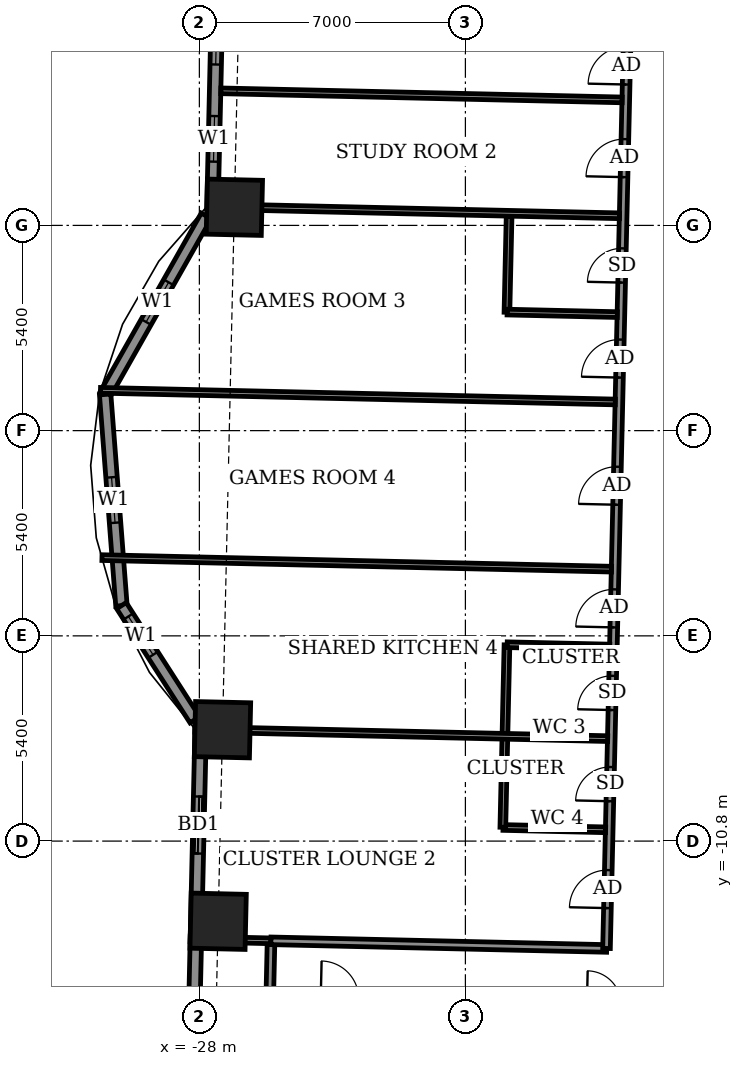
"""IFC4 building model, lengths in metres.
Left out: names, types, materials, properties, quantities, classifications, styles, units other than length and angle.
Written with IfcOpenShell. Run it as: python <this file> out.ifc"""

import sys

from ifc_helpers import new_model, si_unit, direction, frame, frame_2d, origin, origin_2d, place, context, subcontext, project, spatial, rectangle, extrude, element, fill, save


model = new_model("IFC4")
c1 = context("Model", 3, precision=1e-05, world=origin(), true_north=direction((0.0, 1.0)))
c2 = subcontext(c1, "Body", "Model", "MODEL_VIEW")
j1 = project(units=[si_unit("LENGTHUNIT", "METRE"), si_unit("PLANEANGLEUNIT", "RADIAN")], contexts=[c1])
p1 = place(None, origin())
s1 = spatial("IfcSite", under=j1, at=p1, CompositionType="ELEMENT")
p2 = place(p1, origin())
s2 = spatial("IfcBuilding", under=s1, at=p2, CompositionType="ELEMENT")
p3 = place(p2, frame((0.0, 0.0, 67.5)))
s3 = spatial("IfcBuildingStorey", under=s2, at=p3, CompositionType="ELEMENT", Elevation=67.5)
for number, where, z_axis, x_axis in (
    (1, (-27.391, -7.869, -0.55), (0.0, 0.0, 1.0), (-0.023, -1.0, 0.0)),
    (2, (-27.506, -12.909, -0.55), (0.0, 0.0, 1.0), (-0.023, -1.0, 0.0)),
    (3, (-27.079, 5.877, -0.55), (0.0, 0.0, 1.0), (-0.023, -1.0, 0.0)),
):
    element("IfcColumn", number, at=place(p3, frame(where, z_axis=z_axis, x_axis=x_axis)), inside=s3, PredefinedType="COLUMN", context=c2, shape_type="SweptSolid", body=[
        extrude(rectangle(XDim=1.45, YDim=1.45, at=origin_2d()), origin(), (0.0, 0.0, 1.0), 3.6),
    ])
p4 = place(p3, frame((-27.324, 20.462, 0.0), z_axis=(0.0, 0.0, 1.0), x_axis=(-0.022695628174, -0.999742421057, 0.0)))
e4 = element("IfcWall", 4, at=p4, inside=s3, PredefinedType="SOLIDWALL", context=c2, shape_type="SweptSolid", body=[
    extrude(rectangle(XDim=14.63, YDim=0.3, at=frame_2d((7.315, 0.0))), origin(), (0.0, 0.0, 1.0), 3.05),
])
p5 = place(p4, frame((3.118, 0.0, 0.0)))
e5 = element("IfcOpeningElement", 5, at=p5, cuts=e4, PredefinedType="OPENING", context=c2, shape_type="SweptSolid", body=[
    extrude(rectangle(XDim=1.5, YDim=2.4, at=frame_2d((0.75, 1.2))), frame((0.0, 0.16, 0.0), z_axis=(0.0, -1.0, 0.0), x_axis=(1.0, 0.0, 0.0)), (0.0, 0.0, 1.0), 0.32),
])
p6 = place(p4, frame((8.431, 0.0, 0.9)))
e6 = element("IfcOpeningElement", 6, at=p6, cuts=e4, PredefinedType="OPENING", context=c2, shape_type="SweptSolid", body=[
    extrude(rectangle(XDim=2.4, YDim=1.5, at=frame_2d((1.2, 0.75))), frame((0.0, 0.16, 0.0), z_axis=(0.0, -1.0, 0.0), x_axis=(1.0, 0.0, 0.0)), (0.0, 0.0, 1.0), 0.32),
])
p7 = place(p4, frame((12.188, 0.0, 0.9)))
e7 = element("IfcOpeningElement", 7, at=p7, cuts=e4, PredefinedType="OPENING", context=c2, shape_type="SweptSolid", body=[
    extrude(rectangle(XDim=1.2, YDim=1.5, at=frame_2d((0.6, 0.75))), frame((0.0, 0.16, 0.0), z_axis=(0.0, -1.0, 0.0), x_axis=(1.0, 0.0, 0.0)), (0.0, 0.0, 1.0), 0.32),
])
p8 = place(p3, frame((-27.82, 5.65, 0.0), z_axis=(0.0, 0.0, 1.0), x_axis=(-0.492554919955, -0.870281363025, 0.0)))
e8 = element("IfcWall", 8, at=p8, inside=s3, PredefinedType="SOLIDWALL", context=c2, shape_type="SweptSolid", body=[
    extrude(rectangle(XDim=5.398, YDim=0.3, at=frame_2d((2.699, 0.0))), origin(), (0.0, 0.0, 1.0), 3.05),
])
p9 = place(p8, frame((2.008, 0.0, 0.9)))
e9 = element("IfcOpeningElement", 9, at=p9, cuts=e8, PredefinedType="OPENING", context=c2, shape_type="SweptSolid", body=[
    extrude(rectangle(XDim=1.2, YDim=1.5, at=frame_2d((0.6, 0.75))), frame((0.0, 0.16, 0.0), z_axis=(0.0, -1.0, 0.0), x_axis=(1.0, 0.0, 0.0)), (0.0, 0.0, 1.0), 0.32),
])
p10 = place(p3, frame((-30.479, 0.952, 0.0), z_axis=(0.0, 0.0, 1.0), x_axis=(0.076964476481, -0.997033835614, 0.0)))
e10 = element("IfcWall", 10, at=p10, inside=s3, PredefinedType="SOLIDWALL", context=c2, shape_type="SweptSolid", body=[
    extrude(rectangle(XDim=5.573, YDim=0.3, at=frame_2d((2.787, 0.0))), origin(), (0.0, 0.0, 1.0), 3.05),
])
p11 = place(p10, frame((2.186, 0.0, 0.9)))
e11 = element("IfcOpeningElement", 11, at=p11, cuts=e10, PredefinedType="OPENING", context=c2, shape_type="SweptSolid", body=[
    extrude(rectangle(XDim=1.2, YDim=1.5, at=frame_2d((0.6, 0.75))), frame((0.0, 0.16, 0.0), z_axis=(0.0, -1.0, 0.0), x_axis=(1.0, 0.0, 0.0)), (0.0, 0.0, 1.0), 0.32),
])
p12 = place(p3, frame((-30.05, -4.605, 0.0), z_axis=(0.0, 0.0, 1.0), x_axis=(0.540653885242, -0.841245134532, 0.0)))
e12 = element("IfcWall", 12, at=p12, inside=s3, PredefinedType="SOLIDWALL", context=c2, shape_type="SweptSolid", body=[
    extrude(rectangle(XDim=3.57, YDim=0.3, at=frame_2d((1.785, 0.0))), origin(), (0.0, 0.0, 1.0), 3.05),
])
p13 = place(p12, frame((0.338, 0.0, 0.9)))
e13 = element("IfcOpeningElement", 13, at=p13, cuts=e12, PredefinedType="OPENING", context=c2, shape_type="SweptSolid", body=[
    extrude(rectangle(XDim=1.2, YDim=1.5, at=frame_2d((0.6, 0.75))), frame((0.0, 0.16, 0.0), z_axis=(0.0, -1.0, 0.0), x_axis=(1.0, 0.0, 0.0)), (0.0, 0.0, 1.0), 0.32),
])
p14 = place(p3, frame((-27.965, -7.802, 0.0), z_axis=(0.0, 0.0, 1.0), x_axis=(-0.02267786199, -0.999742824218, 0.0)))
e14 = element("IfcWall", 14, at=p14, inside=s3, PredefinedType="SOLIDWALL", context=c2, shape_type="SweptSolid", body=[
    extrude(rectangle(XDim=15.029, YDim=0.3, at=frame_2d((7.514, 0.0))), origin(), (0.0, 0.0, 1.0), 3.05),
])
p15 = place(p14, frame((1.826, 0.0, 0.0)))
e15 = element("IfcOpeningElement", 15, at=p15, cuts=e14, PredefinedType="OPENING", context=c2, shape_type="SweptSolid", body=[
    extrude(rectangle(XDim=1.5, YDim=2.4, at=frame_2d((0.75, 1.2))), frame((0.0, 0.16, 0.0), z_axis=(0.0, -1.0, 0.0), x_axis=(1.0, 0.0, 0.0)), (0.0, 0.0, 1.0), 0.32),
])
p16 = place(p14, frame((11.071, 0.0, 0.9)))
e16 = element("IfcOpeningElement", 16, at=p16, cuts=e14, PredefinedType="OPENING", context=c2, shape_type="SweptSolid", body=[
    extrude(rectangle(XDim=2.4, YDim=1.5, at=frame_2d((1.2, 0.75))), frame((0.0, 0.16, 0.0), z_axis=(0.0, -1.0, 0.0), x_axis=(1.0, 0.0, 0.0)), (0.0, 0.0, 1.0), 0.32),
])
p17 = place(p3, frame((-26.148, -14.924, 0.0), z_axis=(0.0, 0.0, 1.0), x_axis=(0.022617910375, 0.999744182344, 0.0)))
e17 = element("IfcWall", 17, at=p17, inside=s3, PredefinedType="PARTITIONING", context=c2, shape_type="SweptSolid", body=[
    extrude(rectangle(XDim=1.5, YDim=0.2, at=frame_2d((0.75, 0.0))), origin(), (0.0, 0.0, 1.0), 3.05),
])
p18 = place(p3, frame((-28.242, -13.376, 0.0), z_axis=(0.0, 0.0, 1.0), x_axis=(0.999743965862, -0.022627477169, 0.0)))
e18 = element("IfcWall", 18, at=p18, inside=s3, PredefinedType="PARTITIONING", context=c2, shape_type="SweptSolid", body=[
    extrude(rectangle(XDim=2.125, YDim=0.15, at=frame_2d((1.063, 0.0))), origin(), (0.0, 0.0, 1.0), 3.05),
])
p19 = place(p3, frame((-26.117, -13.424, 0.0), z_axis=(0.0, 0.0, 1.0), x_axis=(0.999741493133, -0.022736466476, 0.0)))
e19 = element("IfcWall", 19, at=p19, inside=s3, PredefinedType="PARTITIONING", context=c2, shape_type="SweptSolid", body=[
    extrude(rectangle(XDim=8.837, YDim=0.2, at=frame_2d((4.418, 0.0))), origin(), (0.0, 0.0, 1.0), 3.05),
])
p20 = place(p3, frame((-17.287, -13.625, 0.0), z_axis=(0.0, 0.0, 1.0), x_axis=(0.022712214871, 0.999742044377, 0.0)))
e20 = element("IfcWall", 20, at=p20, inside=s3, PredefinedType="PARTITIONING", context=c2, shape_type="SweptSolid", body=[
    extrude(rectangle(XDim=26.551, YDim=0.2, at=frame_2d((13.275, 0.0))), origin(), (0.0, 0.0, 1.0), 3.05),
])
p21 = place(p20, frame((22.738, 0.0, 0.0)))
e21 = element("IfcOpeningElement", 21, at=p21, cuts=e20, PredefinedType="OPENING", context=c2, shape_type="SweptSolid", body=[
    extrude(rectangle(XDim=1.0, YDim=2.1, at=frame_2d((0.5, 1.05))), frame((0.0, 0.11, 0.0), z_axis=(0.0, -1.0, 0.0), x_axis=(1.0, 0.0, 0.0)), (0.0, 0.0, 1.0), 0.22),
])
p22 = place(p20, frame((24.9, 0.0, 0.0)))
e22 = element("IfcOpeningElement", 22, at=p22, cuts=e20, PredefinedType="OPENING", context=c2, shape_type="SweptSolid", body=[
    extrude(rectangle(XDim=0.9, YDim=2.1, at=frame_2d((0.45, 1.05))), frame((0.0, 0.11, 0.0), z_axis=(0.0, -1.0, 0.0), x_axis=(1.0, 0.0, 0.0)), (0.0, 0.0, 1.0), 0.22),
])
p23 = place(p20, frame((20.3, 0.0, 0.0)))
e23 = element("IfcOpeningElement", 23, at=p23, cuts=e20, PredefinedType="OPENING", context=c2, shape_type="SweptSolid", body=[
    extrude(rectangle(XDim=1.0, YDim=2.1, at=frame_2d((0.5, 1.05))), frame((0.0, 0.11, 0.0), z_axis=(0.0, -1.0, 0.0), x_axis=(1.0, 0.0, 0.0)), (0.0, 0.0, 1.0), 0.22),
])
p24 = place(p20, frame((15.025, 0.0, 0.0)))
e24 = element("IfcOpeningElement", 24, at=p24, cuts=e20, PredefinedType="OPENING", context=c2, shape_type="SweptSolid", body=[
    extrude(rectangle(XDim=1.0, YDim=2.1, at=frame_2d((0.5, 1.05))), frame((0.0, 0.11, 0.0), z_axis=(0.0, -1.0, 0.0), x_axis=(1.0, 0.0, 0.0)), (0.0, 0.0, 1.0), 0.22),
])
p25 = place(p20, frame((17.525, 0.0, 0.0)))
e25 = element("IfcOpeningElement", 25, at=p25, cuts=e20, PredefinedType="OPENING", context=c2, shape_type="SweptSolid", body=[
    extrude(rectangle(XDim=0.9, YDim=2.1, at=frame_2d((0.45, 1.05))), frame((0.0, 0.11, 0.0), z_axis=(0.0, -1.0, 0.0), x_axis=(1.0, 0.0, 0.0)), (0.0, 0.0, 1.0), 0.22),
])
p26 = place(p20, frame((11.678, 0.0, 0.0)))
e26 = element("IfcOpeningElement", 26, at=p26, cuts=e20, PredefinedType="OPENING", context=c2, shape_type="SweptSolid", body=[
    extrude(rectangle(XDim=1.0, YDim=2.1, at=frame_2d((0.5, 1.05))), frame((0.0, 0.11, 0.0), z_axis=(0.0, -1.0, 0.0), x_axis=(1.0, 0.0, 0.0)), (0.0, 0.0, 1.0), 0.22),
])
p27 = place(p20, frame((8.45, 0.0, 0.0)))
e27 = element("IfcOpeningElement", 27, at=p27, cuts=e20, PredefinedType="OPENING", context=c2, shape_type="SweptSolid", body=[
    extrude(rectangle(XDim=1.0, YDim=2.1, at=frame_2d((0.5, 1.05))), frame((0.0, 0.11, 0.0), z_axis=(0.0, -1.0, 0.0), x_axis=(1.0, 0.0, 0.0)), (0.0, 0.0, 1.0), 0.22),
])
p28 = place(p20, frame((6.275, 0.0, 0.0)))
e28 = element("IfcOpeningElement", 28, at=p28, cuts=e20, PredefinedType="OPENING", context=c2, shape_type="SweptSolid", body=[
    extrude(rectangle(XDim=0.9, YDim=2.1, at=frame_2d((0.45, 1.05))), frame((0.0, 0.11, 0.0), z_axis=(0.0, -1.0, 0.0), x_axis=(1.0, 0.0, 0.0)), (0.0, 0.0, 1.0), 0.22),
])
p29 = place(p20, frame((1.062, 0.0, 0.0)))
e29 = element("IfcOpeningElement", 29, at=p29, cuts=e20, PredefinedType="OPENING", context=c2, shape_type="SweptSolid", body=[
    extrude(rectangle(XDim=1.0, YDim=2.1, at=frame_2d((0.5, 1.05))), frame((0.0, 0.11, 0.0), z_axis=(0.0, -1.0, 0.0), x_axis=(1.0, 0.0, 0.0)), (0.0, 0.0, 1.0), 0.22),
])
p30 = place(p20, frame((3.875, 0.0, 0.0)))
e30 = element("IfcOpeningElement", 30, at=p30, cuts=e20, PredefinedType="OPENING", context=c2, shape_type="SweptSolid", body=[
    extrude(rectangle(XDim=0.9, YDim=2.1, at=frame_2d((0.45, 1.05))), frame((0.0, 0.11, 0.0), z_axis=(0.0, -1.0, 0.0), x_axis=(1.0, 0.0, 0.0)), (0.0, 0.0, 1.0), 0.22),
])
p31 = place(p3, frame((-20.01, -10.442, 0.0), z_axis=(0.0, 0.0, 1.0), x_axis=(0.999744396973, -0.02260842146, 0.0)))
e31 = element("IfcWall", 31, at=p31, inside=s3, PredefinedType="PARTITIONING", context=c2, shape_type="SweptSolid", body=[
    extrude(rectangle(XDim=2.7, YDim=0.15, at=frame_2d((1.35, 0.0))), origin(), (0.0, 0.0, 1.0), 3.05),
])
p32 = place(p3, frame((-20.015, -10.437, 0.0), z_axis=(0.0, 0.0, 1.0), x_axis=(0.022683280499, 0.999742701292, 0.0)))
e32 = element("IfcWall", 32, at=p32, inside=s3, PredefinedType="PARTITIONING", context=c2, shape_type="SweptSolid", body=[
    extrude(rectangle(XDim=4.8, YDim=0.15, at=frame_2d((2.4, 0.0))), origin(), (0.0, 0.0, 1.0), 3.05),
])
p33 = place(p3, frame((-28.116, -7.857, 0.0), z_axis=(0.0, 0.0, 1.0), x_axis=(0.999741301527, -0.022744890004, 0.0)))
e33 = element("IfcWall", 33, at=p33, inside=s3, PredefinedType="PARTITIONING", context=c2, shape_type="SweptSolid", body=[
    extrude(rectangle(XDim=10.863, YDim=0.15, at=frame_2d((5.431, 0.0))), origin(), (0.0, 0.0, 1.0), 3.05),
])
p34 = place(p3, frame((-19.901, -5.633, 0.0), z_axis=(0.0, 0.0, 1.0), x_axis=(0.999744396973, -0.02260842146, 0.0)))
e34 = element("IfcWall", 34, at=p34, inside=s3, PredefinedType="PARTITIONING", context=c2, shape_type="SweptSolid", body=[
    extrude(rectangle(XDim=2.7, YDim=0.15, at=frame_2d((1.35, 0.0))), origin(), (0.0, 0.0, 1.0), 3.05),
])
p35 = place(p3, frame((-30.563, -3.341, 0.0), z_axis=(0.0, 0.0, 1.0), x_axis=(0.999743140217, -0.022663927048, 0.0)))
e35 = element("IfcWall", 35, at=p35, inside=s3, PredefinedType="PARTITIONING", context=c2, shape_type="SweptSolid", body=[
    extrude(rectangle(XDim=13.411, YDim=0.15, at=frame_2d((6.706, 0.0))), origin(), (0.0, 0.0, 1.0), 2.1),
])
p36 = place(p3, frame((-30.602, 1.061, 0.0), z_axis=(0.0, 0.0, 1.0), x_axis=(0.999743108275, -0.022665336016, 0.0)))
e36 = element("IfcWall", 36, at=p36, inside=s3, PredefinedType="PARTITIONING", context=c2, shape_type="SweptSolid", body=[
    extrude(rectangle(XDim=13.551, YDim=0.15, at=frame_2d((6.775, 0.0))), origin(), (0.0, 0.0, 1.0), 2.1),
])
p37 = place(p3, frame((-19.907, 3.114, 0.0), z_axis=(0.0, 0.0, 1.0), x_axis=(0.022523775833, 0.999746307581, 0.0)))
e37 = element("IfcWall", 37, at=p37, inside=s3, PredefinedType="PARTITIONING", context=c2, shape_type="SweptSolid", body=[
    extrude(rectangle(XDim=2.526, YDim=0.15, at=frame_2d((1.263, 0.0))), origin(), (0.0, 0.0, 1.0), 3.05),
])
p38 = place(p3, frame((-19.902, 3.119, 0.0), z_axis=(0.0, 0.0, 1.0), x_axis=(0.999741618182, -0.022730967319, 0.0)))
e38 = element("IfcWall", 38, at=p38, inside=s3, PredefinedType="PARTITIONING", context=c2, shape_type="SweptSolid", body=[
    extrude(rectangle(XDim=2.9, YDim=0.15, at=frame_2d((1.45, 0.0))), origin(), (0.0, 0.0, 1.0), 3.05),
])
p39 = place(p3, frame((-27.505, 5.892, 0.0), z_axis=(0.0, 0.0, 1.0), x_axis=(0.999743990669, -0.022626381091, 0.0)))
e39 = element("IfcWall", 39, at=p39, inside=s3, PredefinedType="PARTITIONING", context=c2, shape_type="SweptSolid", body=[
    extrude(rectangle(XDim=10.563, YDim=0.15, at=frame_2d((5.282, 0.0))), origin(), (0.0, 0.0, 1.0), 3.05),
])
p40 = place(p3, frame((-27.435, 8.941, 0.0), z_axis=(0.0, 0.0, 1.0), x_axis=(0.999743955169, -0.022627949603, 0.0)))
e40 = element("IfcWall", 40, at=p40, inside=s3, PredefinedType="PARTITIONING", context=c2, shape_type="SweptSolid", body=[
    extrude(rectangle(XDim=10.563, YDim=0.15, at=frame_2d((5.281, 0.0))), origin(), (0.0, 0.0, 1.0), 2.55),
])
p41 = place(p6, origin())
e41 = element("IfcWindow", 41, at=p41, inside=s3, PartitioningType="DOUBLE_PANEL_VERTICAL", PredefinedType="WINDOW", context=c2, shape_type="SweptSolid", body=[
    extrude(rectangle(XDim=2.4, YDim=1.5, at=frame_2d((1.2, 0.75))), frame((0.0, 0.03, 0.0), z_axis=(0.0, -1.0, 0.0), x_axis=(1.0, 0.0, 0.0)), (0.0, 0.0, 1.0), 0.06),
])
fill(e6, e41)
p42 = place(p7, origin())
e42 = element("IfcWindow", 42, at=p42, inside=s3, PartitioningType="SINGLE_PANEL", PredefinedType="WINDOW", context=c2, shape_type="SweptSolid", body=[
    extrude(rectangle(XDim=1.2, YDim=1.5, at=frame_2d((0.6, 0.75))), frame((0.0, 0.03, 0.0), z_axis=(0.0, -1.0, 0.0), x_axis=(1.0, 0.0, 0.0)), (0.0, 0.0, 1.0), 0.06),
])
fill(e7, e42)
p43 = place(p9, origin())
e43 = element("IfcWindow", 43, at=p43, inside=s3, PartitioningType="SINGLE_PANEL", PredefinedType="WINDOW", context=c2, shape_type="SweptSolid", body=[
    extrude(rectangle(XDim=1.2, YDim=1.5, at=frame_2d((0.6, 0.75))), frame((0.0, 0.03, 0.0), z_axis=(0.0, -1.0, 0.0), x_axis=(1.0, 0.0, 0.0)), (0.0, 0.0, 1.0), 0.06),
])
fill(e9, e43)
p44 = place(p11, origin())
e44 = element("IfcWindow", 44, at=p44, inside=s3, PartitioningType="SINGLE_PANEL", PredefinedType="WINDOW", context=c2, shape_type="SweptSolid", body=[
    extrude(rectangle(XDim=1.2, YDim=1.5, at=frame_2d((0.6, 0.75))), frame((0.0, 0.03, 0.0), z_axis=(0.0, -1.0, 0.0), x_axis=(1.0, 0.0, 0.0)), (0.0, 0.0, 1.0), 0.06),
])
fill(e11, e44)
p45 = place(p13, origin())
e45 = element("IfcWindow", 45, at=p45, inside=s3, PartitioningType="SINGLE_PANEL", PredefinedType="WINDOW", context=c2, shape_type="SweptSolid", body=[
    extrude(rectangle(XDim=1.2, YDim=1.5, at=frame_2d((0.6, 0.75))), frame((0.0, 0.03, 0.0), z_axis=(0.0, -1.0, 0.0), x_axis=(1.0, 0.0, 0.0)), (0.0, 0.0, 1.0), 0.06),
])
fill(e13, e45)
p46 = place(p15, origin())
e46 = element("IfcDoor", 46, at=p46, inside=s3, OperationType="SLIDING_TO_LEFT", PredefinedType="DOOR", context=c2, shape_type="SweptSolid", body=[
    extrude(rectangle(XDim=1.5, YDim=2.4, at=frame_2d((0.75, 1.2))), frame((0.0, 0.025, 0.0), z_axis=(0.0, -1.0, 0.0), x_axis=(1.0, 0.0, 0.0)), (0.0, 0.0, 1.0), 0.05),
])
fill(e15, e46)
p47 = place(p21, origin())
e47 = element("IfcDoor", 47, at=p47, inside=s3, OperationType="SINGLE_SWING_LEFT", PredefinedType="DOOR", context=c2, shape_type="SweptSolid", body=[
    extrude(rectangle(XDim=1.0, YDim=2.1, at=frame_2d((0.5, 1.05))), frame((0.0, 0.025, 0.0), z_axis=(0.0, -1.0, 0.0), x_axis=(1.0, 0.0, 0.0)), (0.0, 0.0, 1.0), 0.05),
])
fill(e21, e47)
p48 = place(p23, origin())
e48 = element("IfcDoor", 48, at=p48, inside=s3, OperationType="SINGLE_SWING_RIGHT", PredefinedType="DOOR", context=c2, shape_type="SweptSolid", body=[
    extrude(rectangle(XDim=1.0, YDim=2.1, at=frame_2d((0.5, 1.05))), frame((0.0, 0.025, 0.0), z_axis=(0.0, -1.0, 0.0), x_axis=(1.0, 0.0, 0.0)), (0.0, 0.0, 1.0), 0.05),
])
fill(e23, e48)
p49 = place(p24, origin())
e49 = element("IfcDoor", 49, at=p49, inside=s3, OperationType="SINGLE_SWING_LEFT", PredefinedType="DOOR", context=c2, shape_type="SweptSolid", body=[
    extrude(rectangle(XDim=1.0, YDim=2.1, at=frame_2d((0.5, 1.05))), frame((0.0, 0.025, 0.0), z_axis=(0.0, -1.0, 0.0), x_axis=(1.0, 0.0, 0.0)), (0.0, 0.0, 1.0), 0.05),
])
fill(e24, e49)
p50 = place(p25, origin())
e50 = element("IfcDoor", 50, at=p50, inside=s3, OperationType="SINGLE_SWING_RIGHT", PredefinedType="DOOR", context=c2, shape_type="SweptSolid", body=[
    extrude(rectangle(XDim=0.9, YDim=2.1, at=frame_2d((0.45, 1.05))), frame((0.0, 0.025, 0.0), z_axis=(0.0, -1.0, 0.0), x_axis=(1.0, 0.0, 0.0)), (0.0, 0.0, 1.0), 0.05),
])
fill(e25, e50)
p51 = place(p26, origin())
e51 = element("IfcDoor", 51, at=p51, inside=s3, OperationType="SINGLE_SWING_RIGHT", PredefinedType="DOOR", context=c2, shape_type="SweptSolid", body=[
    extrude(rectangle(XDim=1.0, YDim=2.1, at=frame_2d((0.5, 1.05))), frame((0.0, 0.025, 0.0), z_axis=(0.0, -1.0, 0.0), x_axis=(1.0, 0.0, 0.0)), (0.0, 0.0, 1.0), 0.05),
])
fill(e26, e51)
p52 = place(p27, origin())
e52 = element("IfcDoor", 52, at=p52, inside=s3, OperationType="SINGLE_SWING_LEFT", PredefinedType="DOOR", context=c2, shape_type="SweptSolid", body=[
    extrude(rectangle(XDim=1.0, YDim=2.1, at=frame_2d((0.5, 1.05))), frame((0.0, 0.025, 0.0), z_axis=(0.0, -1.0, 0.0), x_axis=(1.0, 0.0, 0.0)), (0.0, 0.0, 1.0), 0.05),
])
fill(e27, e52)
p53 = place(p28, origin())
e53 = element("IfcDoor", 53, at=p53, inside=s3, OperationType="SINGLE_SWING_LEFT", PredefinedType="DOOR", context=c2, shape_type="SweptSolid", body=[
    extrude(rectangle(XDim=0.9, YDim=2.1, at=frame_2d((0.45, 1.05))), frame((0.0, 0.025, 0.0), z_axis=(0.0, -1.0, 0.0), x_axis=(1.0, 0.0, 0.0)), (0.0, 0.0, 1.0), 0.05),
])
fill(e28, e53)
p54 = place(p29, origin())
e54 = element("IfcDoor", 54, at=p54, inside=s3, OperationType="SINGLE_SWING_RIGHT", PredefinedType="DOOR", context=c2, shape_type="SweptSolid", body=[
    extrude(rectangle(XDim=1.0, YDim=2.1, at=frame_2d((0.5, 1.05))), frame((0.0, 0.025, 0.0), z_axis=(0.0, -1.0, 0.0), x_axis=(1.0, 0.0, 0.0)), (0.0, 0.0, 1.0), 0.05),
])
fill(e29, e54)
p55 = place(p30, origin())
e55 = element("IfcDoor", 55, at=p55, inside=s3, OperationType="SINGLE_SWING_RIGHT", PredefinedType="DOOR", context=c2, shape_type="SweptSolid", body=[
    extrude(rectangle(XDim=0.9, YDim=2.1, at=frame_2d((0.45, 1.05))), frame((0.0, 0.025, 0.0), z_axis=(0.0, -1.0, 0.0), x_axis=(1.0, 0.0, 0.0)), (0.0, 0.0, 1.0), 0.05),
])
fill(e30, e55)
save(model, sys.argv[1])
